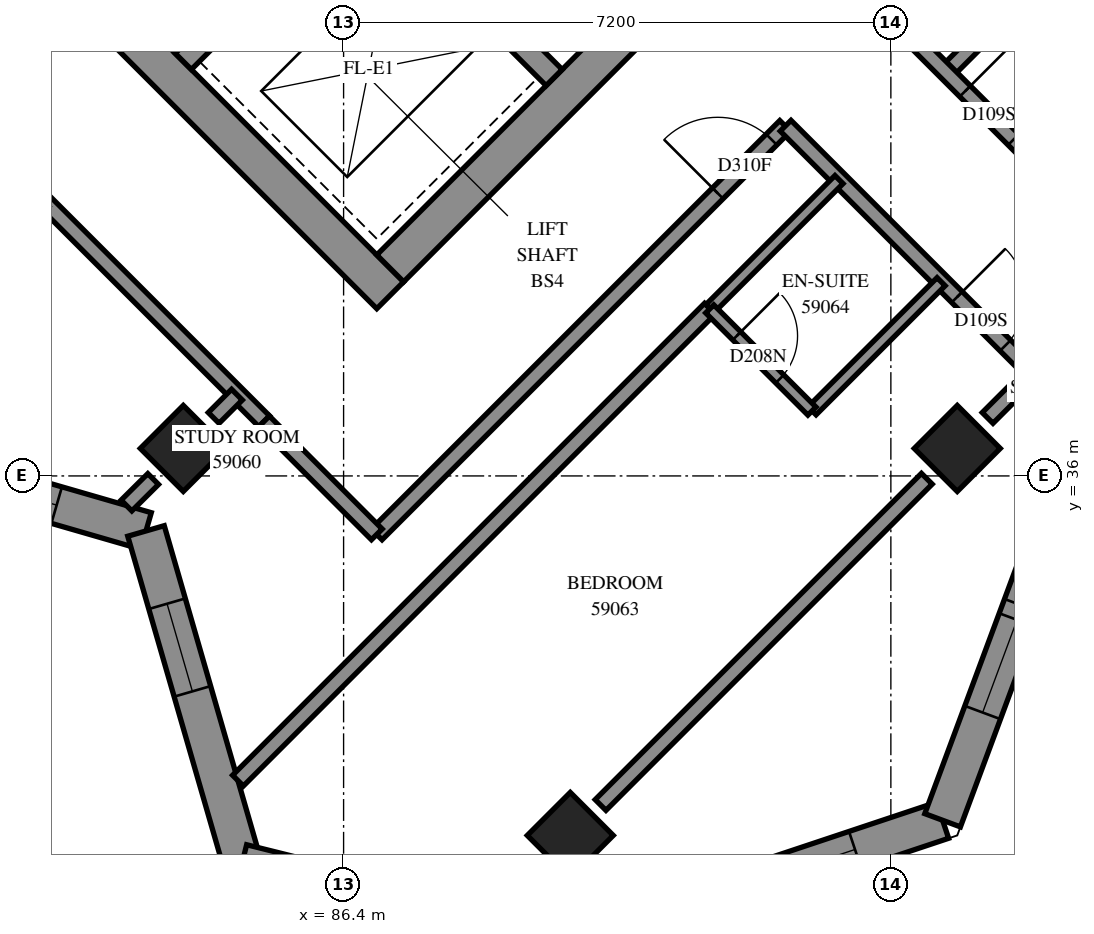
"""IFC4 building model, lengths in metres.
Left out: names, types, materials, properties, quantities, classifications, styles, units other than length and angle.
Written with IfcOpenShell. Run it as: python <this file> out.ifc"""

import sys

from ifc_helpers import new_model, si_unit, direction, frame, frame_2d, origin, origin_2d, place, context, subcontext, project, spatial, polyline, rectangle, outline, extrude, element, fill, save


model = new_model("IFC4")
c1 = context("Model", 3, precision=1e-05, world=origin(), true_north=direction((0.0, 1.0)))
c2 = subcontext(c1, "Body", "Model", "MODEL_VIEW")
j1 = project(units=[si_unit("LENGTHUNIT", "METRE"), si_unit("PLANEANGLEUNIT", "RADIAN")], contexts=[c1])
p1 = place(None, origin())
s1 = spatial("IfcSite", under=j1, at=p1, CompositionType="ELEMENT")
p2 = place(p1, origin())
s2 = spatial("IfcBuilding", under=s1, at=p2, CompositionType="ELEMENT")
p3 = place(p2, frame((0.0, 0.0, 216.8)))
s3 = spatial("IfcBuildingStorey", under=s2, at=p3, CompositionType="ELEMENT", Elevation=216.8)
for number, where, z_axis, x_axis in (
    (1, (84.291, 36.362, 0.0), (0.0, 0.0, 1.0), (0.707, -0.707, 0.0)),
    (2, (94.474, 36.362, 0.0), (0.0, 0.0, 1.0), (0.707, -0.707, 0.0)),
    (3, (89.382, 31.271, 0.0), (0.0, 0.0, 1.0), (0.707, -0.707, 0.0)),
):
    element("IfcColumn", number, at=place(p3, frame(where, z_axis=z_axis, x_axis=x_axis)), inside=s3, PredefinedType="COLUMN", context=c2, shape_type="SweptSolid", body=[
        extrude(rectangle(XDim=0.8, YDim=0.8, at=origin_2d()), origin(), (0.0, 0.0, 1.0), 3.1),
    ])
p4 = place(p3, frame((76.124, 49.267, -0.3), z_axis=(0.0, 0.0, 1.0), x_axis=(0.7071067812, -0.7071067812, 0.0)))
e4 = element("IfcWall", 4, at=p4, inside=s3, PredefinedType="SHEAR", context=c2, shape_type="SweptSolid", body=[
    extrude(rectangle(XDim=15.4, YDim=0.5, at=frame_2d((7.7, 0.0))), origin(), (0.0, 0.0, 1.0), 2.7),
])
p5 = place(p3, frame((87.013, 38.731, -0.3), z_axis=(0.0, 0.0, 1.0), x_axis=(0.7071067812, 0.7071067812, 0.0)))
e5 = element("IfcWall", 5, at=p5, inside=s3, PredefinedType="SHEAR", context=c2, shape_type="SweptSolid", body=[
    extrude(rectangle(XDim=14.4, YDim=0.5, at=frame_2d((7.2, 0.0))), origin(), (0.0, 0.0, 1.0), 2.7),
])
p6 = place(p5, frame((4.55, 0.0, 0.3)))
e6 = element("IfcOpeningElement", 6, at=p6, cuts=e5, PredefinedType="OPENING", context=c2, shape_type="SweptSolid", body=[
    extrude(rectangle(XDim=1.1, YDim=2.1, at=frame_2d((0.55, 1.05))), frame((0.0, 0.26, 0.0), z_axis=(0.0, -1.0, 0.0), x_axis=(1.0, 0.0, 0.0)), (0.0, 0.0, 1.0), 0.52),
])
p7 = place(p5, frame((11.35, 0.0, 0.3)))
e7 = element("IfcOpeningElement", 7, at=p7, cuts=e5, PredefinedType="OPENING", context=c2, shape_type="SweptSolid", body=[
    extrude(rectangle(XDim=1.1, YDim=2.1, at=frame_2d((0.55, 1.05))), frame((0.0, 0.26, 0.0), z_axis=(0.0, -1.0, 0.0), x_axis=(1.0, 0.0, 0.0)), (0.0, 0.0, 1.0), 0.52),
])
p8 = place(p3, frame((84.291, 41.453, 0.0), z_axis=(0.0, 0.0, 1.0), x_axis=(0.7071067812, 0.7071067812, 0.0)))
e8 = element("IfcWall", 8, at=p8, inside=s3, PredefinedType="SOLIDWALL", context=c2, shape_type="SweptSolid", body=[
    extrude(rectangle(XDim=3.3, YDim=0.3, at=frame_2d((1.65, 0.0))), origin(), (0.0, 0.0, 1.0), 3.1),
])
p9 = place(p3, frame((78.988, 51.423, 0.0), z_axis=(0.0, 0.0, 1.0), x_axis=(0.7071067812, -0.7071067812, 0.0)))
e9 = element("IfcWall", 9, at=p9, inside=s3, PredefinedType="SOLIDWALL", context=c2, shape_type="SweptSolid", body=[
    extrude(rectangle(XDim=14.4, YDim=0.3, at=frame_2d((7.2, 0.0))), origin(), (0.0, 0.0, 1.0), 3.1),
])
p10 = place(p9, frame((1.35, 0.0, 0.0)))
e10 = element("IfcOpeningElement", 10, at=p10, cuts=e9, PredefinedType="OPENING", context=c2, shape_type="SweptSolid", body=[
    extrude(rectangle(XDim=0.9, YDim=2.1, at=frame_2d((0.45, 1.05))), frame((0.0, 0.16, 0.0), z_axis=(0.0, -1.0, 0.0), x_axis=(1.0, 0.0, 0.0)), (0.0, 0.0, 1.0), 0.32),
])
p11 = place(p9, frame((4.95, 0.0, 0.0)))
e11 = element("IfcOpeningElement", 11, at=p11, cuts=e9, PredefinedType="OPENING", context=c2, shape_type="SweptSolid", body=[
    extrude(rectangle(XDim=0.9, YDim=2.1, at=frame_2d((0.45, 1.05))), frame((0.0, 0.16, 0.0), z_axis=(0.0, -1.0, 0.0), x_axis=(1.0, 0.0, 0.0)), (0.0, 0.0, 1.0), 0.32),
])
p12 = place(p9, frame((8.55, 0.0, 0.0)))
e12 = element("IfcOpeningElement", 12, at=p12, cuts=e9, PredefinedType="OPENING", context=c2, shape_type="SweptSolid", body=[
    extrude(rectangle(XDim=0.9, YDim=2.1, at=frame_2d((0.45, 1.05))), frame((0.0, 0.16, 0.0), z_axis=(0.0, -1.0, 0.0), x_axis=(1.0, 0.0, 0.0)), (0.0, 0.0, 1.0), 0.32),
])
p13 = place(p9, frame((12.05, 0.0, 0.0)))
e13 = element("IfcOpeningElement", 13, at=p13, cuts=e9, PredefinedType="OPENING", context=c2, shape_type="SweptSolid", body=[
    extrude(rectangle(XDim=1.1, YDim=2.1, at=frame_2d((0.55, 1.05))), frame((0.0, 0.16, 0.0), z_axis=(0.0, -1.0, 0.0), x_axis=(1.0, 0.0, 0.0)), (0.0, 0.0, 1.0), 0.32),
])
p14 = place(p3, frame((89.372, 29.834, 0.0), z_axis=(0.0, 0.0, 1.0), x_axis=(0.9486832981, 0.316227766, 0.0)))
e14 = element("IfcWall", 14, at=p14, inside=s3, PredefinedType="SOLIDWALL", context=c2, shape_type="SweptSolid", body=[
    extrude(outline(polyline([(-0.073, -0.25), (5.294, -0.25), (5.054, 0.25), (0.073, 0.25), (-0.073, -0.25)])), origin(), (0.0, 0.0, 1.0), 3.1),
])
p15 = place(p14, frame((1.159, 0.0, 0.45)))
e15 = element("IfcOpeningElement", 15, at=p15, cuts=e14, PredefinedType="OPENING", context=c2, shape_type="SweptSolid", body=[
    extrude(rectangle(XDim=1.3, YDim=2.5, at=frame_2d((0.65, 1.25))), frame((0.0, 0.26, 0.0), z_axis=(0.0, -1.0, 0.0), x_axis=(1.0, 0.0, 0.0)), (0.0, 0.0, 1.0), 0.52),
])
p16 = place(p14, frame((2.659, 0.0, 0.45)))
e16 = element("IfcOpeningElement", 16, at=p16, cuts=e14, PredefinedType="OPENING", context=c2, shape_type="SweptSolid", body=[
    extrude(rectangle(XDim=1.3, YDim=2.5, at=frame_2d((0.65, 1.25))), frame((0.0, 0.26, 0.0), z_axis=(0.0, -1.0, 0.0), x_axis=(1.0, 0.0, 0.0)), (0.0, 0.0, 1.0), 0.52),
])
p17 = place(p3, frame((94.281, 31.47, 0.0), z_axis=(0.0, 0.0, 1.0), x_axis=(0.3481903374, 0.9374238577, 0.0)))
e17 = element("IfcWall", 17, at=p17, inside=s3, PredefinedType="SOLIDWALL", context=c2, shape_type="SweptSolid", body=[
    extrude(outline(polyline([(-0.12, -0.25), (5.16, -0.25), (5.39, 0.25), (0.12, 0.25), (-0.12, -0.25)])), origin(), (0.0, 0.0, 1.0), 3.1),
])
p18 = place(p17, frame((1.512, 0.0, 0.45)))
e18 = element("IfcOpeningElement", 18, at=p18, cuts=e17, PredefinedType="OPENING", context=c2, shape_type="SweptSolid", body=[
    extrude(rectangle(XDim=1.3, YDim=2.5, at=frame_2d((0.65, 1.25))), frame((0.0, 0.26, 0.0), z_axis=(0.0, -1.0, 0.0), x_axis=(1.0, 0.0, 0.0)), (0.0, 0.0, 1.0), 0.52),
])
p19 = place(p17, frame((3.012, 0.0, 0.45)))
e19 = element("IfcOpeningElement", 19, at=p19, cuts=e17, PredefinedType="OPENING", context=c2, shape_type="SweptSolid", body=[
    extrude(rectangle(XDim=1.3, YDim=2.5, at=frame_2d((0.65, 1.25))), frame((0.0, 0.26, 0.0), z_axis=(0.0, -1.0, 0.0), x_axis=(1.0, 0.0, 0.0)), (0.0, 0.0, 1.0), 0.52),
])
p20 = place(p3, frame((79.43, 36.54, 0.0), z_axis=(0.0, 0.0, 1.0), x_axis=(0.9606541241, -0.2777474642, 0.0)))
e20 = element("IfcWall", 20, at=p20, inside=s3, PredefinedType="SOLIDWALL", context=c2, shape_type="SweptSolid", body=[
    extrude(outline(polyline([(-0.144, -0.25), (4.412, -0.25), (4.688, 0.25), (0.144, 0.25), (-0.144, -0.25)])), origin(), (0.0, 0.0, 1.0), 3.1),
])
p21 = place(p20, frame((0.526, 0.0, 0.45)))
e21 = element("IfcOpeningElement", 21, at=p21, cuts=e20, PredefinedType="OPENING", context=c2, shape_type="SweptSolid", body=[
    extrude(rectangle(XDim=1.3, YDim=2.5, at=frame_2d((0.65, 1.25))), frame((0.0, 0.26, 0.0), z_axis=(0.0, -1.0, 0.0), x_axis=(1.0, 0.0, 0.0)), (0.0, 0.0, 1.0), 0.52),
])
p22 = place(p20, frame((2.026, 0.0, 0.45)))
e22 = element("IfcOpeningElement", 22, at=p22, cuts=e20, PredefinedType="OPENING", context=c2, shape_type="SweptSolid", body=[
    extrude(rectangle(XDim=1.3, YDim=2.5, at=frame_2d((0.65, 1.25))), frame((0.0, 0.26, 0.0), z_axis=(0.0, -1.0, 0.0), x_axis=(1.0, 0.0, 0.0)), (0.0, 0.0, 1.0), 0.52),
])
p23 = place(p3, frame((83.801, 35.276, 0.0), z_axis=(0.0, 0.0, 1.0), x_axis=(0.2777474642, -0.9606541241, 0.0)))
e23 = element("IfcWall", 23, at=p23, inside=s3, PredefinedType="SOLIDWALL", context=c2, shape_type="SweptSolid", body=[
    extrude(outline(polyline([(0.138, -0.25), (4.694, -0.25), (4.406, 0.25), (-0.138, 0.25), (0.138, -0.25)])), origin(), (0.0, 0.0, 1.0), 3.1),
])
p24 = place(p23, frame((0.997, 0.0, 0.45)))
e24 = element("IfcOpeningElement", 24, at=p24, cuts=e23, PredefinedType="OPENING", context=c2, shape_type="SweptSolid", body=[
    extrude(rectangle(XDim=1.2, YDim=2.5, at=frame_2d((0.6, 1.25))), frame((0.0, 0.26, 0.0), z_axis=(0.0, -1.0, 0.0), x_axis=(1.0, 0.0, 0.0)), (0.0, 0.0, 1.0), 0.52),
])
p25 = place(p3, frame((85.064, 30.905, 0.0), z_axis=(0.0, 0.0, 1.0), x_axis=(0.9704161722, -0.2414383002, 0.0)))
e25 = element("IfcWall", 25, at=p25, inside=s3, PredefinedType="SOLIDWALL", context=c2, shape_type="SweptSolid", body=[
    extrude(outline(polyline([(-0.144, -0.25), (4.512, -0.25), (4.367, 0.25), (0.144, 0.25), (-0.144, -0.25)])), origin(), (0.0, 0.0, 1.0), 3.1),
])
p26 = place(p25, frame((2.071, 0.0, 0.45)))
e26 = element("IfcOpeningElement", 26, at=p26, cuts=e25, PredefinedType="OPENING", context=c2, shape_type="SweptSolid", body=[
    extrude(rectangle(XDim=1.2, YDim=2.5, at=frame_2d((0.6, 1.25))), frame((0.0, 0.26, 0.0), z_axis=(0.0, -1.0, 0.0), x_axis=(1.0, 0.0, 0.0)), (0.0, 0.0, 1.0), 0.52),
])
p27 = place(p3, frame((85.01, 31.992, 0.0), z_axis=(0.0, 0.0, 1.0), x_axis=(0.7071010869, 0.7071124754, 0.0)))
e27 = element("IfcWall", 27, at=p27, inside=s3, PredefinedType="PARTITIONING", context=c2, shape_type="SweptSolid", body=[
    extrude(rectangle(XDim=8.781, YDim=0.2, at=frame_2d((4.39, 0.0))), origin(), (0.0, 0.0, 1.0), 3.1),
])
p28 = place(p3, frame((86.835, 35.231, 0.0), z_axis=(0.0, 0.0, 1.0), x_axis=(0.7071067812, 0.7071067812, 0.0)))
e28 = element("IfcWall", 28, at=p28, inside=s3, PredefinedType="PARTITIONING", context=c2, shape_type="SweptSolid", body=[
    extrude(rectangle(XDim=7.6, YDim=0.2, at=frame_2d((3.8, 0.0))), origin(), (0.0, 0.0, 1.0), 3.1),
])
p29 = place(p28, frame((6.346, 0.0, 0.0)))
e29 = element("IfcOpeningElement", 29, at=p29, cuts=e28, PredefinedType="OPENING", context=c2, shape_type="SweptSolid", body=[
    extrude(rectangle(XDim=1.0, YDim=2.1, at=frame_2d((0.5, 1.05))), frame((0.0, 0.11, 0.0), z_axis=(0.0, -1.0, 0.0), x_axis=(1.0, 0.0, 0.0)), (0.0, 0.0, 1.0), 0.22),
])
p30 = place(p3, frame((94.331, 41.313, 0.0), z_axis=(0.0, 0.0, 1.0), x_axis=(0.7072516979, 0.7069618347, 0.0)))
e30 = element("IfcWall", 30, at=p30, inside=s3, PredefinedType="PARTITIONING", context=c2, shape_type="SweptSolid", body=[
    extrude(rectangle(XDim=6.9, YDim=0.2, at=frame_2d((3.45, 0.0))), origin(), (0.0, 0.0, 1.0), 3.1),
])
p31 = place(p3, frame((80.522, 41.553, 0.0), z_axis=(0.0, 0.0, 1.0), x_axis=(0.7071067812, -0.7071067812, 0.0)))
e31 = element("IfcWall", 31, at=p31, inside=s3, PredefinedType="PARTITIONING", context=c2, shape_type="SweptSolid", body=[
    extrude(rectangle(XDim=6.836, YDim=0.2, at=frame_2d((3.418, 0.0))), origin(), (0.0, 0.0, 1.0), 3.1),
])
p32 = place(p3, frame((89.781, 31.671, 0.0), z_axis=(0.0, 0.0, 1.0), x_axis=(0.7071067812, 0.7071067812, 0.0)))
e32 = element("IfcWall", 32, at=p32, inside=s3, PredefinedType="PARTITIONING", context=c2, shape_type="SweptSolid", body=[
    extrude(rectangle(XDim=6.07, YDim=0.2, at=frame_2d((3.035, 0.0))), origin(), (0.0, 0.0, 1.0), 2.6),
])
p33 = place(p3, frame((93.623, 42.015, 0.0), z_axis=(0.0, 0.0, 1.0), x_axis=(0.7071067812, -0.7071067812, 0.0)))
e33 = element("IfcWall", 33, at=p33, inside=s3, PredefinedType="PARTITIONING", context=c2, shape_type="SweptSolid", body=[
    extrude(rectangle(XDim=4.599, YDim=0.2, at=frame_2d((2.3, 0.0))), origin(), (0.0, 0.0, 1.0), 3.1),
])
p34 = place(p33, frame((1.349, 0.0, 0.0)))
e34 = element("IfcOpeningElement", 34, at=p34, cuts=e33, PredefinedType="OPENING", context=c2, shape_type="SweptSolid", body=[
    extrude(rectangle(XDim=0.9, YDim=2.1, at=frame_2d((0.45, 1.05))), frame((0.0, 0.11, 0.0), z_axis=(0.0, -1.0, 0.0), x_axis=(1.0, 0.0, 0.0)), (0.0, 0.0, 1.0), 0.22),
])
p35 = place(p3, frame((92.216, 40.608, 0.0), z_axis=(0.0, 0.0, 1.0), x_axis=(0.7071067812, -0.7071067812, 0.0)))
e35 = element("IfcWall", 35, at=p35, inside=s3, PredefinedType="PARTITIONING", context=c2, shape_type="SweptSolid", body=[
    extrude(rectangle(XDim=4.599, YDim=0.2, at=frame_2d((2.3, 0.0))), origin(), (0.0, 0.0, 1.0), 3.1),
])
p36 = place(p35, frame((3.189, 0.0, 0.0)))
e36 = element("IfcOpeningElement", 36, at=p36, cuts=e35, PredefinedType="OPENING", context=c2, shape_type="SweptSolid", body=[
    extrude(rectangle(XDim=0.9, YDim=2.1, at=frame_2d((0.45, 1.05))), frame((0.0, 0.11, 0.0), z_axis=(0.0, -1.0, 0.0), x_axis=(1.0, 0.0, 0.0)), (0.0, 0.0, 1.0), 0.22),
])
for number, where, z_axis, x_axis in (
    (37, (92.563, 36.857, 0.0), (0.0, 0.0, 1.0), (0.707, 0.707, 0.0)),
    (38, (91.219, 38.201, 0.0), (0.0, 0.0, 1.0), (0.707, 0.707, 0.0)),
):
    element("IfcWall", number, at=place(p3, frame(where, z_axis=z_axis, x_axis=x_axis)), inside=s3, PredefinedType="PARTITIONING", context=c2, shape_type="SweptSolid", body=[
        extrude(rectangle(XDim=2.401, YDim=0.15, at=frame_2d((1.201, 0.0))), origin(), (0.0, 0.0, 1.0), 3.1),
    ])
p37 = place(p3, frame((85.353, 36.717, 0.0), z_axis=(0.0, 0.0, 1.0), x_axis=(0.7066304548, -0.7075827869, 0.0)))
e39 = element("IfcWall", 39, at=p37, inside=s3, PredefinedType="PARTITIONING", context=c2, shape_type="SweptSolid", body=[
    extrude(rectangle(XDim=2.1, YDim=0.2, at=frame_2d((1.05, 0.0))), origin(), (0.0, 0.0, 1.0), 3.1),
])
p38 = place(p3, frame((91.217, 38.197, 0.0), z_axis=(0.0, 0.0, 1.0), x_axis=(0.7071067812, -0.7071067812, 0.0)))
e40 = element("IfcWall", 40, at=p38, inside=s3, PredefinedType="PARTITIONING", context=c2, shape_type="SweptSolid", body=[
    extrude(rectangle(XDim=1.901, YDim=0.15, at=frame_2d((0.95, 0.0))), origin(), (0.0, 0.0, 1.0), 3.1),
])
p39 = place(p38, frame((0.502, 0.0, 0.0)))
e41 = element("IfcOpeningElement", 41, at=p39, cuts=e40, PredefinedType="OPENING", context=c2, shape_type="SweptSolid", body=[
    extrude(rectangle(XDim=0.8, YDim=2.1, at=frame_2d((0.4, 1.05))), frame((0.0, 0.085, 0.0), z_axis=(0.0, -1.0, 0.0), x_axis=(1.0, 0.0, 0.0)), (0.0, 0.0, 1.0), 0.17),
])
p40 = place(p3, frame((94.873, 36.763, 0.0), z_axis=(0.0, 0.0, 1.0), x_axis=(0.7071067812, 0.7071067812, 0.0)))
e42 = element("IfcWall", 42, at=p40, inside=s3, PredefinedType="PARTITIONING", context=c2, shape_type="SweptSolid", body=[
    extrude(rectangle(XDim=0.834, YDim=0.2, at=frame_2d((0.417, 0.0))), origin(), (0.0, 0.0, 1.0), 2.6),
])
p41 = place(p3, frame((83.544, 35.611, 0.0), z_axis=(0.0, 0.0, 1.0), x_axis=(0.7094279578, 0.7047779598, 0.0)))
e43 = element("IfcWall", 43, at=p41, inside=s3, PredefinedType="PARTITIONING", context=c2, shape_type="SweptSolid", body=[
    extrude(rectangle(XDim=0.495, YDim=0.2, at=frame_2d((0.247, 0.0))), origin(), (0.0, 0.0, 1.0), 3.1),
])
p42 = place(p3, frame((84.691, 36.763, 0.0), z_axis=(0.0, 0.0, 1.0), x_axis=(0.7071067812, 0.7071067812, 0.0)))
e44 = element("IfcWall", 44, at=p42, inside=s3, PredefinedType="PARTITIONING", context=c2, shape_type="SweptSolid", body=[
    extrude(rectangle(XDim=0.433, YDim=0.2, at=frame_2d((0.216, 0.0))), origin(), (0.0, 0.0, 1.0), 3.1),
])
p43 = place(p16, origin())
e45 = element("IfcWindow", 45, at=p43, inside=s3, PartitioningType="SINGLE_PANEL", PredefinedType="WINDOW", context=c2, shape_type="SweptSolid", body=[
    extrude(rectangle(XDim=1.3, YDim=2.5, at=frame_2d((0.65, 1.25))), frame((0.0, 0.18, 0.0), z_axis=(0.0, -1.0, 0.0), x_axis=(1.0, 0.0, 0.0)), (0.0, 0.0, 1.0), 0.06),
])
fill(e16, e45)
p44 = place(p18, origin())
e46 = element("IfcWindow", 46, at=p44, inside=s3, PartitioningType="SINGLE_PANEL", PredefinedType="WINDOW", context=c2, shape_type="SweptSolid", body=[
    extrude(rectangle(XDim=1.3, YDim=2.5, at=frame_2d((0.65, 1.25))), frame((0.0, 0.18, 0.0), z_axis=(0.0, -1.0, 0.0), x_axis=(1.0, 0.0, 0.0)), (0.0, 0.0, 1.0), 0.06),
])
fill(e18, e46)
p45 = place(p19, origin())
e47 = element("IfcWindow", 47, at=p45, inside=s3, PartitioningType="SINGLE_PANEL", PredefinedType="WINDOW", context=c2, shape_type="SweptSolid", body=[
    extrude(rectangle(XDim=1.3, YDim=2.5, at=frame_2d((0.65, 1.25))), frame((0.0, 0.18, 0.0), z_axis=(0.0, -1.0, 0.0), x_axis=(1.0, 0.0, 0.0)), (0.0, 0.0, 1.0), 0.06),
])
fill(e19, e47)
p46 = place(p22, origin())
e48 = element("IfcWindow", 48, at=p46, inside=s3, PartitioningType="SINGLE_PANEL", PredefinedType="WINDOW", context=c2, shape_type="SweptSolid", body=[
    extrude(rectangle(XDim=1.3, YDim=2.5, at=frame_2d((0.65, 1.25))), frame((0.0, 0.18, 0.0), z_axis=(0.0, -1.0, 0.0), x_axis=(1.0, 0.0, 0.0)), (0.0, 0.0, 1.0), 0.06),
])
fill(e22, e48)
p47 = place(p24, origin())
e49 = element("IfcWindow", 49, at=p47, inside=s3, PartitioningType="SINGLE_PANEL", PredefinedType="WINDOW", context=c2, shape_type="SweptSolid", body=[
    extrude(rectangle(XDim=1.2, YDim=2.5, at=frame_2d((0.6, 1.25))), frame((0.0, 0.18, 0.0), z_axis=(0.0, -1.0, 0.0), x_axis=(1.0, 0.0, 0.0)), (0.0, 0.0, 1.0), 0.06),
])
fill(e24, e49)
p48 = place(p29, origin())
e50 = element("IfcDoor", 50, at=p48, inside=s3, OperationType="SINGLE_SWING_RIGHT", PredefinedType="DOOR", context=c2, shape_type="SweptSolid", body=[
    extrude(rectangle(XDim=1.0, YDim=2.1, at=frame_2d((0.5, 1.05))), frame((0.0, 0.025, 0.0), z_axis=(0.0, -1.0, 0.0), x_axis=(1.0, 0.0, 0.0)), (0.0, 0.0, 1.0), 0.05),
])
fill(e29, e50)
p49 = place(p34, origin())
e51 = element("IfcDoor", 51, at=p49, inside=s3, OperationType="SINGLE_SWING_RIGHT", PredefinedType="DOOR", context=c2, shape_type="SweptSolid", body=[
    extrude(rectangle(XDim=0.9, YDim=2.1, at=frame_2d((0.45, 1.05))), frame((0.0, 0.025, 0.0), z_axis=(0.0, -1.0, 0.0), x_axis=(1.0, 0.0, 0.0)), (0.0, 0.0, 1.0), 0.05),
])
fill(e34, e51)
p50 = place(p36, origin())
e52 = element("IfcDoor", 52, at=p50, inside=s3, OperationType="SINGLE_SWING_LEFT", PredefinedType="DOOR", context=c2, shape_type="SweptSolid", body=[
    extrude(rectangle(XDim=0.9, YDim=2.1, at=frame_2d((0.45, 1.05))), frame((0.0, 0.025, 0.0), z_axis=(0.0, -1.0, 0.0), x_axis=(1.0, 0.0, 0.0)), (0.0, 0.0, 1.0), 0.05),
])
fill(e36, e52)
p51 = place(p39, origin())
e53 = element("IfcDoor", 53, at=p51, inside=s3, OperationType="SINGLE_SWING_RIGHT", PredefinedType="DOOR", context=c2, shape_type="SweptSolid", body=[
    extrude(rectangle(XDim=0.8, YDim=2.1, at=frame_2d((0.4, 1.05))), frame((0.0, 0.025, 0.0), z_axis=(0.0, -1.0, 0.0), x_axis=(1.0, 0.0, 0.0)), (0.0, 0.0, 1.0), 0.05),
])
fill(e41, e53)
save(model, sys.argv[1])
